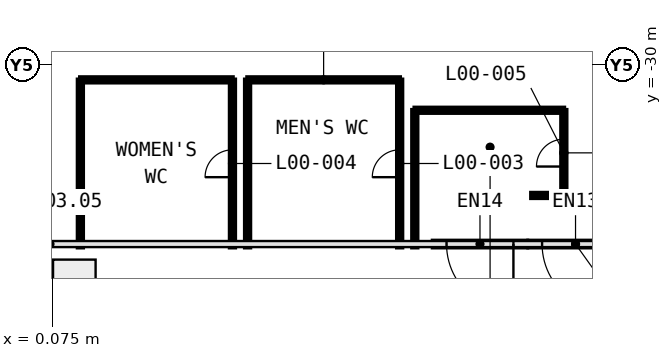
"""IFC4 building model, lengths in metres.
Left out: names, types, materials, properties, quantities, classifications, styles, units other than length and angle.
Written with IfcOpenShell. Run it as: python <this file> out.ifc"""

import sys

from ifc_helpers import new_model, si_unit, direction, frame, frame_2d, origin, place, context, subcontext, project, spatial, rectangle, extrude, element, fill, save


model = new_model("IFC4")
c1 = context("Model", 3, precision=1e-05, world=origin(), true_north=direction((0.0, 1.0)))
c2 = subcontext(c1, "Body", "Model", "MODEL_VIEW")
j1 = project(units=[si_unit("LENGTHUNIT", "METRE"), si_unit("PLANEANGLEUNIT", "RADIAN")], contexts=[c1])
p1 = place(None, origin())
s1 = spatial("IfcSite", under=j1, at=p1, CompositionType="ELEMENT")
p2 = place(p1, origin())
s2 = spatial("IfcBuilding", under=s1, at=p2, CompositionType="ELEMENT")
p3 = place(p2, origin())
s3 = spatial("IfcBuildingStorey", under=s2, at=p3, CompositionType="ELEMENT", Elevation=0.0)
p4 = place(p3, frame((18.827, -35.9, 0.0), z_axis=(0.0, 0.0, 1.0), x_axis=(-1.0, 0.0, 0.0)))
e1 = element("IfcWall", 1, at=p4, inside=s3, PredefinedType="SOLIDWALL", context=c2, shape_type="SweptSolid", body=[
    extrude(rectangle(XDim=3.083, YDim=0.2, at=frame_2d((1.542, 0.0))), origin(), (0.0, 0.0, 1.0), 2.7),
])
p5 = place(p4, frame((0.441, 0.0, 0.0)))
e2 = element("IfcOpeningElement", 2, at=p5, cuts=e1, PredefinedType="OPENING", context=c2, shape_type="SweptSolid", body=[
    extrude(rectangle(XDim=2.2, YDim=2.4, at=frame_2d((1.1, 1.2))), frame((0.0, 0.11, 0.0), z_axis=(0.0, -1.0, 0.0), x_axis=(1.0, 0.0, 0.0)), (0.0, 0.0, 1.0), 0.22),
])
p6 = place(p3, frame((15.684, -35.9, 0.0), z_axis=(0.0, 0.0, 1.0), x_axis=(-1.0, 0.0, 0.0)))
e3 = element("IfcWall", 3, at=p6, inside=s3, PredefinedType="SOLIDWALL", context=c2, shape_type="SweptSolid", body=[
    extrude(rectangle(XDim=3.083, YDim=0.2, at=frame_2d((1.542, 0.0))), origin(), (0.0, 0.0, 1.0), 2.7),
])
p7 = place(p6, frame((0.441, 0.0, 0.0)))
e4 = element("IfcOpeningElement", 4, at=p7, cuts=e3, PredefinedType="OPENING", context=c2, shape_type="SweptSolid", body=[
    extrude(rectangle(XDim=2.2, YDim=2.4, at=frame_2d((1.1, 1.2))), frame((0.0, 0.11, 0.0), z_axis=(0.0, -1.0, 0.0), x_axis=(1.0, 0.0, 0.0)), (0.0, 0.0, 1.0), 0.22),
])
p8 = place(p3, frame((11.501, -36.0, 0.0), z_axis=(0.0, 0.0, 1.0), x_axis=(0.0, 1.0, 0.0)))
e5 = element("IfcWall", 5, at=p8, inside=s3, PredefinedType="PARTITIONING", context=c2, shape_type="SweptSolid", body=[
    extrude(rectangle(XDim=5.5, YDim=0.15, at=frame_2d((2.75, 0.0))), origin(), (0.0, 0.0, 1.0), 8.6),
])
p9 = place(p8, frame((2.3, 0.0, 0.0)))
e6 = element("IfcOpeningElement", 6, at=p9, cuts=e5, PredefinedType="OPENING", context=c2, shape_type="SweptSolid", body=[
    extrude(rectangle(XDim=0.9, YDim=2.1, at=frame_2d((0.45, 1.05))), frame((0.0, 0.085, 0.0), z_axis=(0.0, -1.0, 0.0), x_axis=(1.0, 0.0, 0.0)), (0.0, 0.0, 1.0), 0.17),
])
p10 = place(p3, frame((11.5, -30.499, 0.0), z_axis=(0.0, 0.0, 1.0), x_axis=(-1.0, 0.0, 0.0)))
e7 = element("IfcWall", 7, at=p10, inside=s3, PredefinedType="PARTITIONING", context=c2, shape_type="SweptSolid", body=[
    extrude(rectangle(XDim=5.0, YDim=0.15, at=frame_2d((2.5, 0.0))), origin(), (0.0, 0.0, 1.0), 7.58),
])
p11 = place(p3, frame((6.499, -30.5, 0.0), z_axis=(0.0, 0.0, 1.0), x_axis=(0.0, -1.0, 0.0)))
e8 = element("IfcWall", 8, at=p11, inside=s3, PredefinedType="PARTITIONING", context=c2, shape_type="SweptSolid", body=[
    extrude(rectangle(XDim=5.5, YDim=0.15, at=frame_2d((2.75, 0.0))), origin(), (0.0, 0.0, 1.0), 8.6),
])
p12 = place(p3, frame((6.001, -36.0, 0.0), z_axis=(0.0, 0.0, 1.0), x_axis=(0.0, 1.0, 0.0)))
e9 = element("IfcWall", 9, at=p12, inside=s3, PredefinedType="PARTITIONING", context=c2, shape_type="SweptSolid", body=[
    extrude(rectangle(XDim=5.5, YDim=0.15, at=frame_2d((2.75, 0.0))), origin(), (0.0, 0.0, 1.0), 8.6),
])
p13 = place(p12, frame((2.3, 0.0, 0.0)))
e10 = element("IfcOpeningElement", 10, at=p13, cuts=e9, PredefinedType="OPENING", context=c2, shape_type="SweptSolid", body=[
    extrude(rectangle(XDim=0.9, YDim=2.1, at=frame_2d((0.45, 1.05))), frame((0.0, 0.085, 0.0), z_axis=(0.0, -1.0, 0.0), x_axis=(1.0, 0.0, 0.0)), (0.0, 0.0, 1.0), 0.17),
])
p14 = place(p3, frame((6.0, -30.499, 0.0), z_axis=(0.0, 0.0, 1.0), x_axis=(-1.0, 0.0, 0.0)))
e11 = element("IfcWall", 11, at=p14, inside=s3, PredefinedType="PARTITIONING", context=c2, shape_type="SweptSolid", body=[
    extrude(rectangle(XDim=5.0, YDim=0.15, at=frame_2d((2.5, 0.0))), origin(), (0.0, 0.0, 1.0), 8.6),
])
p15 = place(p3, frame((0.999, -30.5, 0.0), z_axis=(0.0, 0.0, 1.0), x_axis=(0.0, -1.0, 0.0)))
e12 = element("IfcWall", 12, at=p15, inside=s3, PredefinedType="PARTITIONING", context=c2, shape_type="SweptSolid", body=[
    extrude(rectangle(XDim=5.5, YDim=0.15, at=frame_2d((2.75, 0.0))), origin(), (0.0, 0.0, 1.0), 8.6),
])
p16 = place(p3, frame((15.837, -34.301, 0.0), z_axis=(0.0, 0.0, 1.0), x_axis=(1.0, 0.0, 0.0)))
e13 = element("IfcWall", 13, at=p16, inside=s3, PredefinedType="PARTITIONING", context=c2, shape_type="SweptSolid", body=[
    extrude(rectangle(XDim=1.063, YDim=0.15, at=frame_2d((0.532, 0.0))), origin(), (0.0, 0.0, 1.0), 8.6),
])
p17 = place(p3, frame((16.901, -34.3, 0.0), z_axis=(0.0, 0.0, 1.0), x_axis=(0.0, 1.0, 0.0)))
e14 = element("IfcWall", 14, at=p17, inside=s3, PredefinedType="PARTITIONING", context=c2, shape_type="SweptSolid", body=[
    extrude(rectangle(XDim=2.8, YDim=0.15, at=frame_2d((1.4, 0.0))), origin(), (0.0, 0.0, 1.0), 8.6),
])
p18 = place(p17, frame((0.95, 0.0, 0.0)))
e15 = element("IfcOpeningElement", 15, at=p18, cuts=e14, PredefinedType="OPENING", context=c2, shape_type="SweptSolid", body=[
    extrude(rectangle(XDim=0.9, YDim=2.1, at=frame_2d((0.45, 1.05))), frame((0.0, 0.085, 0.0), z_axis=(0.0, -1.0, 0.0), x_axis=(1.0, 0.0, 0.0)), (0.0, 0.0, 1.0), 0.17),
])
p19 = place(p3, frame((16.9, -31.499, 0.0), z_axis=(0.0, 0.0, 1.0), x_axis=(-1.0, 0.0, 0.0)))
e16 = element("IfcWall", 16, at=p19, inside=s3, PredefinedType="PARTITIONING", context=c2, shape_type="SweptSolid", body=[
    extrude(rectangle(XDim=4.9, YDim=0.15, at=frame_2d((2.45, 0.0))), origin(), (0.0, 0.0, 1.0), 8.6),
])
p20 = place(p3, frame((11.999, -31.5, 0.0), z_axis=(0.0, 0.0, 1.0), x_axis=(0.0, -1.0, 0.0)))
e17 = element("IfcWall", 17, at=p20, inside=s3, PredefinedType="PARTITIONING", context=c2, shape_type="SweptSolid", body=[
    extrude(rectangle(XDim=4.5, YDim=0.15, at=frame_2d((2.25, 0.0))), origin(), (0.0, 0.0, 1.0), 8.6),
])
p21 = place(p5, origin())
e18 = element("IfcDoor", 18, at=p21, inside=s3, OperationType="DOUBLE_DOOR_DOUBLE_SWING", PredefinedType="DOOR", context=c2, shape_type="SweptSolid", body=[
    extrude(rectangle(XDim=2.2, YDim=2.4, at=frame_2d((1.1, 1.2))), frame((0.0, 0.025, 0.0), z_axis=(0.0, -1.0, 0.0), x_axis=(1.0, 0.0, 0.0)), (0.0, 0.0, 1.0), 0.05),
])
fill(e2, e18)
p22 = place(p7, origin())
e19 = element("IfcDoor", 19, at=p22, inside=s3, OperationType="DOUBLE_DOOR_DOUBLE_SWING", PredefinedType="DOOR", context=c2, shape_type="SweptSolid", body=[
    extrude(rectangle(XDim=2.2, YDim=2.4, at=frame_2d((1.1, 1.2))), frame((0.0, 0.025, 0.0), z_axis=(0.0, -1.0, 0.0), x_axis=(1.0, 0.0, 0.0)), (0.0, 0.0, 1.0), 0.05),
])
fill(e4, e19)
p23 = place(p9, origin())
e20 = element("IfcDoor", 20, at=p23, inside=s3, OperationType="SINGLE_SWING_LEFT", PredefinedType="DOOR", context=c2, shape_type="SweptSolid", body=[
    extrude(rectangle(XDim=0.9, YDim=2.1, at=frame_2d((0.45, 1.05))), frame((0.0, 0.025, 0.0), z_axis=(0.0, -1.0, 0.0), x_axis=(1.0, 0.0, 0.0)), (0.0, 0.0, 1.0), 0.05),
])
fill(e6, e20)
p24 = place(p13, origin())
e21 = element("IfcDoor", 21, at=p24, inside=s3, OperationType="SINGLE_SWING_RIGHT", PredefinedType="DOOR", context=c2, shape_type="SweptSolid", body=[
    extrude(rectangle(XDim=0.9, YDim=2.1, at=frame_2d((0.45, 1.05))), frame((0.0, 0.025, 0.0), z_axis=(0.0, -1.0, 0.0), x_axis=(1.0, 0.0, 0.0)), (0.0, 0.0, 1.0), 0.05),
])
fill(e10, e21)
p25 = place(p18, origin())
e22 = element("IfcDoor", 22, at=p25, inside=s3, OperationType="SINGLE_SWING_LEFT", PredefinedType="DOOR", context=c2, shape_type="SweptSolid", body=[
    extrude(rectangle(XDim=0.9, YDim=2.1, at=frame_2d((0.45, 1.05))), frame((0.0, 0.025, 0.0), z_axis=(0.0, -1.0, 0.0), x_axis=(1.0, 0.0, 0.0)), (0.0, 0.0, 1.0), 0.05),
])
fill(e15, e22)
save(model, sys.argv[1])
